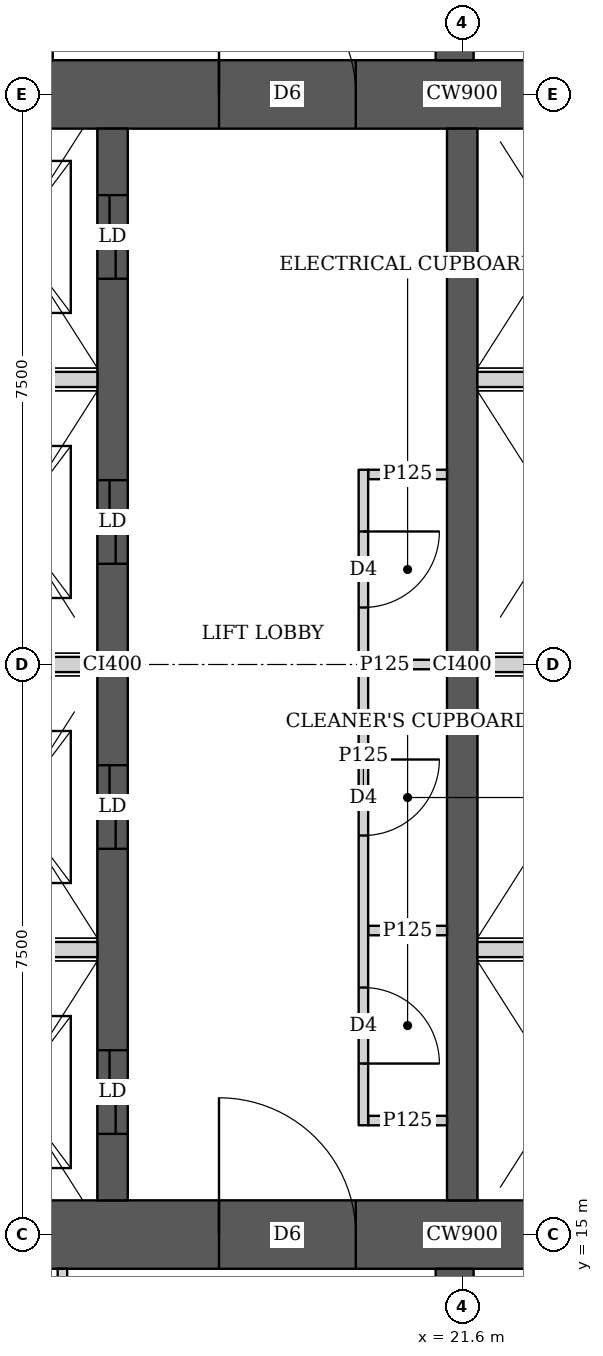
"""IFC4 building model, lengths in metres.
Left out: names, types, materials, properties, quantities, classifications, styles, units other than length and angle.
Written with IfcOpenShell. Run it as: python <this file> out.ifc"""

import sys

from ifc_helpers import new_model, si_unit, direction, frame, frame_2d, origin, place, context, subcontext, project, spatial, rectangle, extrude, element, fill, save


model = new_model("IFC4")
c1 = context("Model", 3, precision=1e-05, world=origin(), true_north=direction((0.0, 1.0)))
c2 = subcontext(c1, "Body", "Model", "MODEL_VIEW")
j1 = project(units=[si_unit("LENGTHUNIT", "METRE"), si_unit("PLANEANGLEUNIT", "RADIAN")], contexts=[c1])
p1 = place(None, origin())
s1 = spatial("IfcSite", under=j1, at=p1, CompositionType="ELEMENT")
p2 = place(p1, origin())
s2 = spatial("IfcBuilding", under=s1, at=p2, CompositionType="ELEMENT")
p3 = place(p2, frame((0.0, 0.0, 126.65)))
s3 = spatial("IfcBuildingStorey", under=s2, at=p3, CompositionType="ELEMENT", Elevation=126.65)
p4 = place(p3, frame((13.95, 15.0, 0.0), z_axis=(0.0, 0.0, 1.0), x_axis=(1.0, 0.0, 0.0)))
e1 = element("IfcWall", 1, at=p4, inside=s3, PredefinedType="SHEAR", context=c2, shape_type="SweptSolid", body=[
    extrude(rectangle(XDim=15.3, YDim=0.9, at=frame_2d((7.65, 0.0))), origin(), (0.0, 0.0, 1.0), 3.75),
])
p5 = place(p4, frame((4.45, 0.0, 0.0)))
e2 = element("IfcOpeningElement", 2, at=p5, cuts=e1, PredefinedType="OPENING", context=c2, shape_type="SweptSolid", body=[
    extrude(rectangle(XDim=1.8, YDim=2.1, at=frame_2d((0.9, 1.05))), frame((0.0, 0.46, 0.0), z_axis=(0.0, -1.0, 0.0), x_axis=(1.0, 0.0, 0.0)), (0.0, 0.0, 1.0), 0.92),
])
p6 = place(p4, frame((10.7, 0.0, 0.0)))
e3 = element("IfcOpeningElement", 3, at=p6, cuts=e1, PredefinedType="OPENING", context=c2, shape_type="SweptSolid", body=[
    extrude(rectangle(XDim=1.1, YDim=2.1, at=frame_2d((0.55, 1.05))), frame((0.0, 0.46, 0.0), z_axis=(0.0, -1.0, 0.0), x_axis=(1.0, 0.0, 0.0)), (0.0, 0.0, 1.0), 0.92),
])
p7 = place(p3, frame((13.95, 30.0, 0.0), z_axis=(0.0, 0.0, 1.0), x_axis=(1.0, 0.0, 0.0)))
e4 = element("IfcWall", 4, at=p7, inside=s3, PredefinedType="SHEAR", context=c2, shape_type="SweptSolid", body=[
    extrude(rectangle(XDim=15.3, YDim=0.9, at=frame_2d((7.65, 0.0))), origin(), (0.0, 0.0, 1.0), 3.75),
])
p8 = place(p7, frame((4.45, 0.0, 0.0)))
e5 = element("IfcOpeningElement", 5, at=p8, cuts=e4, PredefinedType="OPENING", context=c2, shape_type="SweptSolid", body=[
    extrude(rectangle(XDim=1.8, YDim=2.1, at=frame_2d((0.9, 1.05))), frame((0.0, 0.46, 0.0), z_axis=(0.0, -1.0, 0.0), x_axis=(1.0, 0.0, 0.0)), (0.0, 0.0, 1.0), 0.92),
])
p9 = place(p7, frame((10.7, 0.0, 0.0)))
e6 = element("IfcOpeningElement", 6, at=p9, cuts=e4, PredefinedType="OPENING", context=c2, shape_type="SweptSolid", body=[
    extrude(rectangle(XDim=1.1, YDim=2.1, at=frame_2d((0.55, 1.05))), frame((0.0, 0.46, 0.0), z_axis=(0.0, -1.0, 0.0), x_axis=(1.0, 0.0, 0.0)), (0.0, 0.0, 1.0), 0.92),
])
p10 = place(p3, frame((17.0, 15.45, 0.0), z_axis=(0.0, 0.0, 1.0), x_axis=(0.0, 1.0, 0.0)))
e7 = element("IfcWall", 7, at=p10, inside=s3, PredefinedType="SHEAR", context=c2, shape_type="SweptSolid", body=[
    extrude(rectangle(XDim=14.1, YDim=0.4, at=frame_2d((7.05, 0.0))), origin(), (0.0, 0.0, 1.0), 3.75),
])
p11 = place(p10, frame((0.875, 0.0, 0.0)))
e8 = element("IfcOpeningElement", 8, at=p11, cuts=e7, PredefinedType="OPENING", context=c2, shape_type="SweptSolid", body=[
    extrude(rectangle(XDim=1.1, YDim=2.1, at=frame_2d((0.55, 1.05))), frame((0.0, 0.21, 0.0), z_axis=(0.0, -1.0, 0.0), x_axis=(1.0, 0.0, 0.0)), (0.0, 0.0, 1.0), 0.42),
])
p12 = place(p10, frame((4.625, 0.0, 0.0)))
e9 = element("IfcOpeningElement", 9, at=p12, cuts=e7, PredefinedType="OPENING", context=c2, shape_type="SweptSolid", body=[
    extrude(rectangle(XDim=1.1, YDim=2.1, at=frame_2d((0.55, 1.05))), frame((0.0, 0.21, 0.0), z_axis=(0.0, -1.0, 0.0), x_axis=(1.0, 0.0, 0.0)), (0.0, 0.0, 1.0), 0.42),
])
p13 = place(p10, frame((8.375, 0.0, 0.0)))
e10 = element("IfcOpeningElement", 10, at=p13, cuts=e7, PredefinedType="OPENING", context=c2, shape_type="SweptSolid", body=[
    extrude(rectangle(XDim=1.1, YDim=2.1, at=frame_2d((0.55, 1.05))), frame((0.0, 0.21, 0.0), z_axis=(0.0, -1.0, 0.0), x_axis=(1.0, 0.0, 0.0)), (0.0, 0.0, 1.0), 0.42),
])
p14 = place(p10, frame((12.125, 0.0, 0.0)))
e11 = element("IfcOpeningElement", 11, at=p14, cuts=e7, PredefinedType="OPENING", context=c2, shape_type="SweptSolid", body=[
    extrude(rectangle(XDim=1.1, YDim=2.1, at=frame_2d((0.55, 1.05))), frame((0.0, 0.21, 0.0), z_axis=(0.0, -1.0, 0.0), x_axis=(1.0, 0.0, 0.0)), (0.0, 0.0, 1.0), 0.42),
])
p15 = place(p3, frame((21.6, 15.45, 0.0), z_axis=(0.0, 0.0, 1.0), x_axis=(0.0, 1.0, 0.0)))
e12 = element("IfcWall", 12, at=p15, inside=s3, PredefinedType="SHEAR", context=c2, shape_type="SweptSolid", body=[
    extrude(rectangle(XDim=14.1, YDim=0.4, at=frame_2d((7.05, 0.0))), origin(), (0.0, 0.0, 1.0), 3.75),
])
for number, where, z_axis, x_axis in (
    (13, (21.5, 10.35, 0.0), (0.0, 0.0, 1.0), (0.0, 1.0, 0.0)),
    (14, (21.5, 30.45, 0.0), (0.0, 0.0, 1.0), (0.0, 1.0, 0.0)),
):
    element("IfcWall", number, at=place(p3, frame(where, z_axis=z_axis, x_axis=x_axis)), inside=s3, PredefinedType="SHEAR", context=c2, shape_type="SweptSolid", body=[
        extrude(rectangle(XDim=4.2, YDim=0.5, at=frame_2d((2.1, 0.0))), origin(), (0.0, 0.0, 1.0), 3.75),
    ])
p16 = place(p3, frame((16.34, 10.163, 0.0), z_axis=(0.0, 0.0, 1.0), x_axis=(0.0, 1.0, 0.0)))
e15 = element("IfcWall", 15, at=p16, inside=s3, PredefinedType="PARTITIONING", context=c2, shape_type="SweptSolid", body=[
    extrude(rectangle(XDim=4.387, YDim=0.125, at=frame_2d((2.193, 0.0))), origin(), (0.0, 0.0, 1.0), 3.45),
])
p17 = place(p16, frame((1.637, 0.0, 0.0)))
e16 = element("IfcOpeningElement", 16, at=p17, cuts=e15, PredefinedType="OPENING", context=c2, shape_type="SweptSolid", body=[
    extrude(rectangle(XDim=1.0, YDim=2.1, at=frame_2d((0.5, 1.05))), frame((0.0, 0.073, 0.0), z_axis=(0.0, -1.0, 0.0), x_axis=(1.0, 0.0, 0.0)), (0.0, 0.0, 1.0), 0.145),
])
p18 = place(p3, frame((16.15, 30.45, 0.0), z_axis=(0.0, 0.0, 1.0), x_axis=(0.0, 1.0, 0.0)))
e17 = element("IfcWall", 17, at=p18, inside=s3, PredefinedType="PARTITIONING", context=c2, shape_type="SweptSolid", body=[
    extrude(rectangle(XDim=4.387, YDim=0.125, at=frame_2d((2.193, 0.0))), origin(), (0.0, 0.0, 1.0), 3.45),
])
p19 = place(p18, frame((1.75, 0.0, 0.0)))
e18 = element("IfcOpeningElement", 18, at=p19, cuts=e17, PredefinedType="OPENING", context=c2, shape_type="SweptSolid", body=[
    extrude(rectangle(XDim=1.0, YDim=2.1, at=frame_2d((0.5, 1.05))), frame((0.0, 0.073, 0.0), z_axis=(0.0, -1.0, 0.0), x_axis=(1.0, 0.0, 0.0)), (0.0, 0.0, 1.0), 0.145),
])
p20 = place(p3, frame((20.3, 16.438, 0.0), z_axis=(0.0, 0.0, 1.0), x_axis=(0.0, 1.0, 0.0)))
e19 = element("IfcWall", 19, at=p20, inside=s3, PredefinedType="PARTITIONING", context=c2, shape_type="SweptSolid", body=[
    extrude(rectangle(XDim=8.624, YDim=0.125, at=frame_2d((4.312, 0.0))), origin(), (0.0, 0.0, 1.0), 3.45),
])
p21 = place(p20, frame((0.812, 0.0, 0.0)))
e20 = element("IfcOpeningElement", 20, at=p21, cuts=e19, PredefinedType="OPENING", context=c2, shape_type="SweptSolid", body=[
    extrude(rectangle(XDim=1.0, YDim=2.1, at=frame_2d((0.5, 1.05))), frame((0.0, 0.073, 0.0), z_axis=(0.0, -1.0, 0.0), x_axis=(1.0, 0.0, 0.0)), (0.0, 0.0, 1.0), 0.145),
])
p22 = place(p20, frame((3.812, 0.0, 0.0)))
e21 = element("IfcOpeningElement", 21, at=p22, cuts=e19, PredefinedType="OPENING", context=c2, shape_type="SweptSolid", body=[
    extrude(rectangle(XDim=1.0, YDim=2.1, at=frame_2d((0.5, 1.05))), frame((0.0, 0.073, 0.0), z_axis=(0.0, -1.0, 0.0), x_axis=(1.0, 0.0, 0.0)), (0.0, 0.0, 1.0), 0.145),
])
p23 = place(p20, frame((6.812, 0.0, 0.0)))
e22 = element("IfcOpeningElement", 22, at=p23, cuts=e19, PredefinedType="OPENING", context=c2, shape_type="SweptSolid", body=[
    extrude(rectangle(XDim=1.0, YDim=2.1, at=frame_2d((0.5, 1.05))), frame((0.0, 0.073, 0.0), z_axis=(0.0, -1.0, 0.0), x_axis=(1.0, 0.0, 0.0)), (0.0, 0.0, 1.0), 0.145),
])
for number, where, z_axis, x_axis in (
    (23, (20.363, 16.5, 0.0), (0.0, 0.0, 1.0), (1.0, 0.0, 0.0)),
    (24, (20.363, 25.0, 0.0), (0.0, 0.0, 1.0), (1.0, 0.0, 0.0)),
    (25, (20.363, 19.0, 0.0), (0.0, 0.0, 1.0), (1.0, 0.0, 0.0)),
    (26, (20.363, 22.5, 0.0), (0.0, 0.0, 1.0), (1.0, 0.0, 0.0)),
):
    element("IfcWall", number, at=place(p3, frame(where, z_axis=z_axis, x_axis=x_axis)), inside=s3, PredefinedType="PARTITIONING", context=c2, shape_type="SweptSolid", body=[
        extrude(rectangle(XDim=1.037, YDim=0.125, at=frame_2d((0.519, 0.0))), origin(), (0.0, 0.0, 1.0), 3.45),
    ])
p24 = place(p3, frame((14.85, 18.75, 0.0), z_axis=(0.0, 0.0, 1.0), x_axis=(1.0, 0.0, 0.0)))
e27 = element("IfcWall", 27, at=p24, inside=s3, PredefinedType="SOLIDWALL", context=c2, shape_type="SweptSolid", body=[
    extrude(rectangle(XDim=1.95, YDim=0.2, at=frame_2d((0.975, 0.0))), origin(), (0.0, 0.0, 1.0), 3.45),
])
p25 = place(p3, frame((21.8, 18.75, 0.0), z_axis=(0.0, 0.0, 1.0), x_axis=(1.0, 0.0, 0.0)))
e28 = element("IfcWall", 28, at=p25, inside=s3, PredefinedType="SOLIDWALL", context=c2, shape_type="SweptSolid", body=[
    extrude(rectangle(XDim=2.2, YDim=0.2, at=frame_2d((1.1, 0.0))), origin(), (0.0, 0.0, 1.0), 3.45),
])
p26 = place(p3, frame((14.85, 22.5, 0.0), z_axis=(0.0, 0.0, 1.0), x_axis=(1.0, 0.0, 0.0)))
e29 = element("IfcWall", 29, at=p26, inside=s3, PredefinedType="SOLIDWALL", context=c2, shape_type="SweptSolid", body=[
    extrude(rectangle(XDim=1.95, YDim=0.2, at=frame_2d((0.975, 0.0))), origin(), (0.0, 0.0, 1.0), 3.45),
])
p27 = place(p3, frame((21.8, 22.5, 0.0), z_axis=(0.0, 0.0, 1.0), x_axis=(1.0, 0.0, 0.0)))
e30 = element("IfcWall", 30, at=p27, inside=s3, PredefinedType="SOLIDWALL", context=c2, shape_type="SweptSolid", body=[
    extrude(rectangle(XDim=2.2, YDim=0.2, at=frame_2d((1.1, 0.0))), origin(), (0.0, 0.0, 1.0), 3.45),
])
p28 = place(p3, frame((14.85, 26.25, 0.0), z_axis=(0.0, 0.0, 1.0), x_axis=(1.0, 0.0, 0.0)))
e31 = element("IfcWall", 31, at=p28, inside=s3, PredefinedType="SOLIDWALL", context=c2, shape_type="SweptSolid", body=[
    extrude(rectangle(XDim=1.95, YDim=0.2, at=frame_2d((0.975, 0.0))), origin(), (0.0, 0.0, 1.0), 3.45),
])
p29 = place(p3, frame((21.8, 26.25, 0.0), z_axis=(0.0, 0.0, 1.0), x_axis=(1.0, 0.0, 0.0)))
e32 = element("IfcWall", 32, at=p29, inside=s3, PredefinedType="SOLIDWALL", context=c2, shape_type="SweptSolid", body=[
    extrude(rectangle(XDim=2.2, YDim=0.2, at=frame_2d((1.1, 0.0))), origin(), (0.0, 0.0, 1.0), 3.45),
])
p30 = place(p21, origin())
e33 = element("IfcDoor", 33, at=p30, inside=s3, OperationType="SINGLE_SWING_RIGHT", PredefinedType="DOOR", context=c2, shape_type="SweptSolid", body=[
    extrude(rectangle(XDim=1.0, YDim=2.1, at=frame_2d((0.5, 1.05))), frame((0.0, 0.025, 0.0), z_axis=(0.0, -1.0, 0.0), x_axis=(1.0, 0.0, 0.0)), (0.0, 0.0, 1.0), 0.05),
])
fill(e20, e33)
p31 = place(p22, origin())
e34 = element("IfcDoor", 34, at=p31, inside=s3, OperationType="SINGLE_SWING_LEFT", PredefinedType="DOOR", context=c2, shape_type="SweptSolid", body=[
    extrude(rectangle(XDim=1.0, YDim=2.1, at=frame_2d((0.5, 1.05))), frame((0.0, 0.025, 0.0), z_axis=(0.0, -1.0, 0.0), x_axis=(1.0, 0.0, 0.0)), (0.0, 0.0, 1.0), 0.05),
])
fill(e21, e34)
p32 = place(p23, origin())
e35 = element("IfcDoor", 35, at=p32, inside=s3, OperationType="SINGLE_SWING_LEFT", PredefinedType="DOOR", context=c2, shape_type="SweptSolid", body=[
    extrude(rectangle(XDim=1.0, YDim=2.1, at=frame_2d((0.5, 1.05))), frame((0.0, 0.025, 0.0), z_axis=(0.0, -1.0, 0.0), x_axis=(1.0, 0.0, 0.0)), (0.0, 0.0, 1.0), 0.05),
])
fill(e22, e35)
p33 = place(p5, origin())
e36 = element("IfcDoor", 36, at=p33, inside=s3, OperationType="DOUBLE_DOOR_SINGLE_SWING", PredefinedType="DOOR", context=c2, shape_type="SweptSolid", body=[
    extrude(rectangle(XDim=1.8, YDim=2.1, at=frame_2d((0.9, 1.05))), frame((0.0, 0.025, 0.0), z_axis=(0.0, -1.0, 0.0), x_axis=(1.0, 0.0, 0.0)), (0.0, 0.0, 1.0), 0.05),
])
fill(e2, e36)
p34 = place(p8, origin())
e37 = element("IfcDoor", 37, at=p34, inside=s3, OperationType="DOUBLE_DOOR_SINGLE_SWING", PredefinedType="DOOR", context=c2, shape_type="SweptSolid", body=[
    extrude(rectangle(XDim=1.8, YDim=2.1, at=frame_2d((0.9, 1.05))), frame((0.0, 0.025, 0.0), z_axis=(0.0, -1.0, 0.0), x_axis=(1.0, 0.0, 0.0)), (0.0, 0.0, 1.0), 0.05),
])
fill(e5, e37)
p35 = place(p11, origin())
e38 = element("IfcDoor", 38, at=p35, inside=s3, OperationType="DOUBLE_DOOR_SLIDING", PredefinedType="DOOR", context=c2, shape_type="SweptSolid", body=[
    extrude(rectangle(XDim=1.1, YDim=2.1, at=frame_2d((0.55, 1.05))), frame((0.0, 0.025, 0.0), z_axis=(0.0, -1.0, 0.0), x_axis=(1.0, 0.0, 0.0)), (0.0, 0.0, 1.0), 0.05),
])
fill(e8, e38)
p36 = place(p12, origin())
e39 = element("IfcDoor", 39, at=p36, inside=s3, OperationType="DOUBLE_DOOR_SLIDING", PredefinedType="DOOR", context=c2, shape_type="SweptSolid", body=[
    extrude(rectangle(XDim=1.1, YDim=2.1, at=frame_2d((0.55, 1.05))), frame((0.0, 0.025, 0.0), z_axis=(0.0, -1.0, 0.0), x_axis=(1.0, 0.0, 0.0)), (0.0, 0.0, 1.0), 0.05),
])
fill(e9, e39)
p37 = place(p13, origin())
e40 = element("IfcDoor", 40, at=p37, inside=s3, OperationType="DOUBLE_DOOR_SLIDING", PredefinedType="DOOR", context=c2, shape_type="SweptSolid", body=[
    extrude(rectangle(XDim=1.1, YDim=2.1, at=frame_2d((0.55, 1.05))), frame((0.0, 0.025, 0.0), z_axis=(0.0, -1.0, 0.0), x_axis=(1.0, 0.0, 0.0)), (0.0, 0.0, 1.0), 0.05),
])
fill(e10, e40)
p38 = place(p14, origin())
e41 = element("IfcDoor", 41, at=p38, inside=s3, OperationType="DOUBLE_DOOR_SLIDING", PredefinedType="DOOR", context=c2, shape_type="SweptSolid", body=[
    extrude(rectangle(XDim=1.1, YDim=2.1, at=frame_2d((0.55, 1.05))), frame((0.0, 0.025, 0.0), z_axis=(0.0, -1.0, 0.0), x_axis=(1.0, 0.0, 0.0)), (0.0, 0.0, 1.0), 0.05),
])
fill(e11, e41)
save(model, sys.argv[1])
